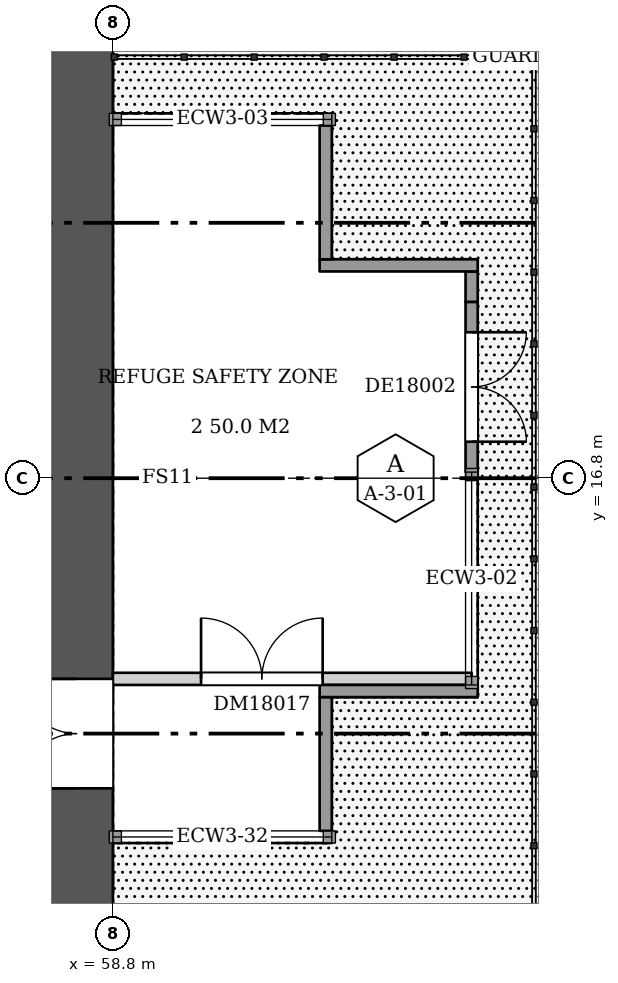
"""IFC4 building model, lengths in metres.
Left out: names, types, materials, properties, quantities, classifications, styles, units other than length and angle.
Written with IfcOpenShell. Run it as: python <this file> out.ifc"""

import sys

from ifc_helpers import new_model, si_unit, direction, frame, frame_2d, origin, place, context, subcontext, project, spatial, rectangle, extrude, element, fill, save


model = new_model("IFC4")
c1 = context("Model", 3, precision=1e-05, world=origin(), true_north=direction((0.0, 1.0)))
c2 = subcontext(c1, "Body", "Model", "MODEL_VIEW")
j1 = project(units=[si_unit("LENGTHUNIT", "METRE"), si_unit("PLANEANGLEUNIT", "RADIAN")], contexts=[c1])
p1 = place(None, origin())
s1 = spatial("IfcSite", under=j1, at=p1, CompositionType="ELEMENT")
p2 = place(p1, origin())
s2 = spatial("IfcBuilding", under=s1, at=p2, CompositionType="ELEMENT")
p3 = place(p2, frame((0.0, 0.0, 74.2)))
s3 = spatial("IfcBuildingStorey", under=s2, at=p3, CompositionType="ELEMENT", Elevation=74.2)
p4 = place(p3, frame((58.2, 9.6, 0.0), z_axis=(0.0, 0.0, 1.0), x_axis=(0.0, 1.0, 0.0)))
e1 = element("IfcWall", 1, at=p4, inside=s3, PredefinedType="SHEAR", context=c2, shape_type="SweptSolid", body=[
    extrude(rectangle(XDim=14.4, YDim=1.2, at=frame_2d((7.2, 0.0))), origin(), (0.0, 0.0, 1.0), 6.72),
])
p5 = place(p4, frame((2.1, 0.0, 0.0)))
e2 = element("IfcOpeningElement", 2, at=p5, cuts=e1, PredefinedType="OPENING", context=c2, shape_type="SweptSolid", body=[
    extrude(rectangle(XDim=1.8, YDim=2.1, at=frame_2d((0.9, 1.05))), frame((0.0, 0.61, 0.0), z_axis=(0.0, -1.0, 0.0), x_axis=(1.0, 0.0, 0.0)), (0.0, 0.0, 1.0), 1.22),
])
p6 = place(p3, frame((58.8, 13.5, 0.0), z_axis=(0.0, 0.0, 1.0), x_axis=(1.0, 0.0, 0.0)))
e3 = element("IfcWall", 3, at=p6, inside=s3, PredefinedType="PARTITIONING", context=c2, shape_type="SweptSolid", body=[
    extrude(rectangle(XDim=5.9, YDim=0.2, at=frame_2d((2.95, 0.0))), origin(), (0.0, 0.0, 1.0), 6.72),
])
p7 = place(p6, frame((1.45, 0.0, 0.0)))
e4 = element("IfcOpeningElement", 4, at=p7, cuts=e3, PredefinedType="OPENING", context=c2, shape_type="SweptSolid", body=[
    extrude(rectangle(XDim=2.0, YDim=2.1, at=frame_2d((1.0, 1.05))), frame((0.0, 0.11, 0.0), z_axis=(0.0, -1.0, 0.0), x_axis=(1.0, 0.0, 0.0)), (0.0, 0.0, 1.0), 0.22),
])
p8 = place(p3, frame((62.3, 11.0, 0.0), z_axis=(0.0, 0.0, 1.0), x_axis=(0.0, 1.0, 0.0)))
e5 = element("IfcWall", 5, at=p8, inside=s3, PredefinedType="SOLIDWALL", context=c2, shape_type="SweptSolid", body=[
    extrude(rectangle(XDim=2.2, YDim=0.2, at=frame_2d((1.1, 0.0))), origin(), (0.0, 0.0, 1.0), 6.72),
])
p9 = place(p3, frame((62.2, 13.3, 0.0), z_axis=(0.0, 0.0, 1.0), x_axis=(1.0, 0.0, 0.0)))
e6 = element("IfcWall", 6, at=p9, inside=s3, PredefinedType="SOLIDWALL", context=c2, shape_type="SweptSolid", body=[
    extrude(rectangle(XDim=2.6, YDim=0.2, at=frame_2d((1.3, 0.0))), origin(), (0.0, 0.0, 1.0), 6.72),
])
p10 = place(p3, frame((64.7, 16.9, 0.0), z_axis=(0.0, 0.0, 1.0), x_axis=(0.0, 1.0, 0.0)))
e7 = element("IfcWall", 7, at=p10, inside=s3, PredefinedType="SOLIDWALL", context=c2, shape_type="SweptSolid", body=[
    extrude(rectangle(XDim=2.8, YDim=0.2, at=frame_2d((1.4, 0.0))), origin(), (0.0, 0.0, 1.0), 6.72),
])
p11 = place(p10, frame((0.5, 0.0, 0.0)))
e8 = element("IfcOpeningElement", 8, at=p11, cuts=e7, PredefinedType="OPENING", context=c2, shape_type="SweptSolid", body=[
    extrude(rectangle(XDim=1.8, YDim=2.4, at=frame_2d((0.9, 1.2))), frame((0.0, 0.11, 0.0), z_axis=(0.0, -1.0, 0.0), x_axis=(1.0, 0.0, 0.0)), (0.0, 0.0, 1.0), 0.22),
])
p12 = place(p3, frame((64.7, 19.7, 0.0), z_axis=(0.0, 0.0, 1.0), x_axis=(0.0, 1.0, 0.0)))
e9 = element("IfcWall", 9, at=p12, inside=s3, PredefinedType="SOLIDWALL", context=c2, shape_type="SweptSolid", body=[
    extrude(rectangle(XDim=0.5, YDim=0.2, at=frame_2d((0.25, 0.0))), origin(), (0.0, 0.0, 1.0), 6.72),
])
p13 = place(p3, frame((64.8, 20.3, 0.0), z_axis=(0.0, 0.0, 1.0), x_axis=(-1.0, 0.0, 0.0)))
e10 = element("IfcWall", 10, at=p13, inside=s3, PredefinedType="SOLIDWALL", context=c2, shape_type="SweptSolid", body=[
    extrude(rectangle(XDim=2.6, YDim=0.2, at=frame_2d((1.3, 0.0))), origin(), (0.0, 0.0, 1.0), 6.72),
])
p14 = place(p3, frame((62.3, 20.4, 0.0), z_axis=(0.0, 0.0, 1.0), x_axis=(0.0, 1.0, 0.0)))
e11 = element("IfcWall", 11, at=p14, inside=s3, PredefinedType="SOLIDWALL", context=c2, shape_type="SweptSolid", body=[
    extrude(rectangle(XDim=2.2, YDim=0.2, at=frame_2d((1.1, 0.0))), origin(), (0.0, 0.0, 1.0), 6.72),
])
p15 = place(p5, origin())
e12 = element("IfcDoor", 12, at=p15, inside=s3, OperationType="DOUBLE_DOOR_SINGLE_SWING", PredefinedType="DOOR", context=c2, shape_type="SweptSolid", body=[
    extrude(rectangle(XDim=1.8, YDim=2.1, at=frame_2d((0.9, 1.05))), frame((0.0, 0.025, 0.0), z_axis=(0.0, -1.0, 0.0), x_axis=(1.0, 0.0, 0.0)), (0.0, 0.0, 1.0), 0.05),
])
fill(e2, e12)
p16 = place(p7, origin())
e13 = element("IfcDoor", 13, at=p16, inside=s3, OperationType="DOUBLE_DOOR_SINGLE_SWING", PredefinedType="DOOR", context=c2, shape_type="SweptSolid", body=[
    extrude(rectangle(XDim=2.0, YDim=2.1, at=frame_2d((1.0, 1.05))), frame((0.0, 0.025, 0.0), z_axis=(0.0, -1.0, 0.0), x_axis=(1.0, 0.0, 0.0)), (0.0, 0.0, 1.0), 0.05),
])
fill(e4, e13)
p17 = place(p11, frame((1.8, 0.0, 0.0), z_axis=(0.0, 0.0, 1.0), x_axis=(-1.0, 0.0, 0.0)))
e14 = element("IfcDoor", 14, at=p17, inside=s3, OperationType="DOUBLE_DOOR_SINGLE_SWING", PredefinedType="DOOR", context=c2, shape_type="SweptSolid", body=[
    extrude(rectangle(XDim=1.8, YDim=2.4, at=frame_2d((0.9, 1.2))), frame((0.0, 0.025, 0.0), z_axis=(0.0, -1.0, 0.0), x_axis=(1.0, 0.0, 0.0)), (0.0, 0.0, 1.0), 0.05),
])
fill(e8, e14)
save(model, sys.argv[1])
